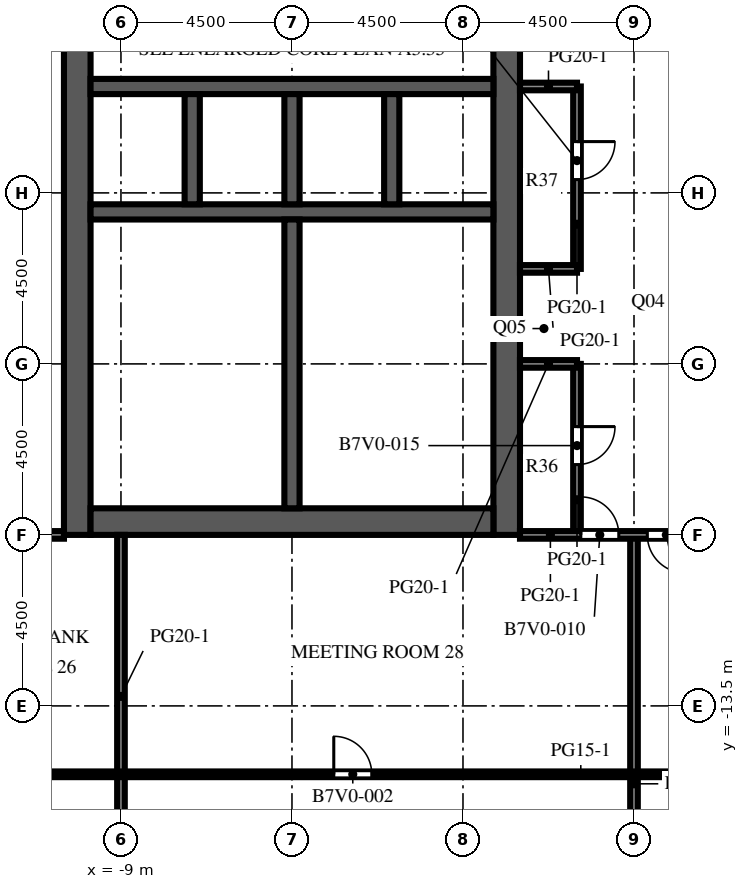
"""IFC4 building model, lengths in metres.
Left out: names, types, materials, properties, quantities, classifications, styles, units other than length and angle.
Written with IfcOpenShell. Run it as: python <this file> out.ifc"""

import sys

from ifc_helpers import new_model, si_unit, direction, frame, frame_2d, origin, place, context, subcontext, project, spatial, rectangle, extrude, element, fill, save


model = new_model("IFC4")
c1 = context("Model", 3, precision=1e-05, world=origin(), true_north=direction((0.0, 1.0)))
c2 = subcontext(c1, "Body", "Model", "MODEL_VIEW")
j1 = project(units=[si_unit("LENGTHUNIT", "METRE"), si_unit("PLANEANGLEUNIT", "RADIAN")], contexts=[c1])
p1 = place(None, origin())
s1 = spatial("IfcSite", under=j1, at=p1, CompositionType="ELEMENT")
p2 = place(p1, origin())
s2 = spatial("IfcBuilding", under=s1, at=p2, CompositionType="ELEMENT")
p3 = place(p2, frame((0.0, 0.0, 239.8)))
s3 = spatial("IfcBuildingStorey", under=s2, at=p3, CompositionType="ELEMENT", Elevation=239.8)
p4 = place(p3, frame((-10.15, -9.0, 0.0), z_axis=(0.0, 0.0, 1.0), x_axis=(0.0, 1.0, 0.0)))
e1 = element("IfcWall", 1, at=p4, inside=s3, PredefinedType="SHEAR", context=c2, shape_type="SweptSolid", body=[
    extrude(rectangle(XDim=27.5, YDim=0.7, at=frame_2d((13.75, 0.0))), origin(), (0.0, 0.0, 1.0), 4.1),
])
p5 = place(p4, frame((12.55, 0.0, 0.0)))
e2 = element("IfcOpeningElement", 2, at=p5, cuts=e1, PredefinedType="OPENING", context=c2, shape_type="SweptSolid", body=[
    extrude(rectangle(XDim=2.4, YDim=2.4, at=frame_2d((1.2, 1.2))), frame((0.0, 0.36, 0.0), z_axis=(0.0, -1.0, 0.0), x_axis=(1.0, 0.0, 0.0)), (0.0, 0.0, 1.0), 0.72),
])
p6 = place(p4, frame((6.825, 0.0, 0.0)))
e3 = element("IfcOpeningElement", 3, at=p6, cuts=e1, PredefinedType="OPENING", context=c2, shape_type="SweptSolid", body=[
    extrude(rectangle(XDim=1.2, YDim=2.1, at=frame_2d((0.6, 1.05))), frame((0.0, 0.36, 0.0), z_axis=(0.0, -1.0, 0.0), x_axis=(1.0, 0.0, 0.0)), (0.0, 0.0, 1.0), 0.72),
])
p7 = place(p4, frame((19.475, 0.0, 0.0)))
e4 = element("IfcOpeningElement", 4, at=p7, cuts=e1, PredefinedType="OPENING", context=c2, shape_type="SweptSolid", body=[
    extrude(rectangle(XDim=1.2, YDim=2.1, at=frame_2d((0.6, 1.05))), frame((0.0, 0.36, 0.0), z_axis=(0.0, -1.0, 0.0), x_axis=(1.0, 0.0, 0.0)), (0.0, 0.0, 1.0), 0.72),
])
p8 = place(p3, frame((1.15, -9.0, 0.0), z_axis=(0.0, 0.0, 1.0), x_axis=(0.0, 1.0, 0.0)))
e5 = element("IfcWall", 5, at=p8, inside=s3, PredefinedType="SHEAR", context=c2, shape_type="SweptSolid", body=[
    extrude(rectangle(XDim=27.5, YDim=0.7, at=frame_2d((13.75, 0.0))), origin(), (0.0, 0.0, 1.0), 4.1),
])
p9 = place(p8, frame((12.55, 0.0, 0.0)))
e6 = element("IfcOpeningElement", 6, at=p9, cuts=e5, PredefinedType="OPENING", context=c2, shape_type="SweptSolid", body=[
    extrude(rectangle(XDim=2.4, YDim=2.4, at=frame_2d((1.2, 1.2))), frame((0.0, 0.36, 0.0), z_axis=(0.0, -1.0, 0.0), x_axis=(1.0, 0.0, 0.0)), (0.0, 0.0, 1.0), 0.72),
])
p10 = place(p8, frame((5.42, 0.0, 0.0)))
e7 = element("IfcOpeningElement", 7, at=p10, cuts=e5, PredefinedType="OPENING", context=c2, shape_type="SweptSolid", body=[
    extrude(rectangle(XDim=1.2, YDim=2.1, at=frame_2d((0.6, 1.05))), frame((0.0, 0.36, 0.0), z_axis=(0.0, -1.0, 0.0), x_axis=(1.0, 0.0, 0.0)), (0.0, 0.0, 1.0), 0.72),
])
p11 = place(p8, frame((19.46, 0.0, 0.0)))
e8 = element("IfcOpeningElement", 8, at=p11, cuts=e5, PredefinedType="OPENING", context=c2, shape_type="SweptSolid", body=[
    extrude(rectangle(XDim=1.0, YDim=2.1, at=frame_2d((0.5, 1.05))), frame((0.0, 0.36, 0.0), z_axis=(0.0, -1.0, 0.0), x_axis=(1.0, 0.0, 0.0)), (0.0, 0.0, 1.0), 0.72),
])
p12 = place(p8, frame((21.17, 0.0, 0.0)))
e9 = element("IfcOpeningElement", 9, at=p12, cuts=e5, PredefinedType="OPENING", context=c2, shape_type="SweptSolid", body=[
    extrude(rectangle(XDim=1.0, YDim=2.1, at=frame_2d((0.5, 1.05))), frame((0.0, 0.36, 0.0), z_axis=(0.0, -1.0, 0.0), x_axis=(1.0, 0.0, 0.0)), (0.0, 0.0, 1.0), 0.72),
])
p13 = place(p8, frame((23.26, 0.0, 0.0)))
e10 = element("IfcOpeningElement", 10, at=p13, cuts=e5, PredefinedType="OPENING", context=c2, shape_type="SweptSolid", body=[
    extrude(rectangle(XDim=1.0, YDim=2.1, at=frame_2d((0.5, 1.05))), frame((0.0, 0.36, 0.0), z_axis=(0.0, -1.0, 0.0), x_axis=(1.0, 0.0, 0.0)), (0.0, 0.0, 1.0), 0.72),
])
p14 = place(p8, frame((25.35, 0.0, 0.0)))
e11 = element("IfcOpeningElement", 11, at=p14, cuts=e5, PredefinedType="OPENING", context=c2, shape_type="SweptSolid", body=[
    extrude(rectangle(XDim=1.0, YDim=2.1, at=frame_2d((0.5, 1.05))), frame((0.0, 0.36, 0.0), z_axis=(0.0, -1.0, 0.0), x_axis=(1.0, 0.0, 0.0)), (0.0, 0.0, 1.0), 0.72),
])
p15 = place(p3, frame((-9.8, -8.65, 0.0), z_axis=(0.0, 0.0, 1.0), x_axis=(1.0, 0.0, 0.0)))
e12 = element("IfcWall", 12, at=p15, inside=s3, PredefinedType="SHEAR", context=c2, shape_type="SweptSolid", body=[
    extrude(rectangle(XDim=10.6, YDim=0.7, at=frame_2d((5.3, 0.0))), origin(), (0.0, 0.0, 1.0), 4.1),
])
p16 = place(p3, frame((-9.8, -0.5, 0.0), z_axis=(0.0, 0.0, 1.0), x_axis=(1.0, 0.0, 0.0)))
e13 = element("IfcWall", 13, at=p16, inside=s3, PredefinedType="SHEAR", context=c2, shape_type="SweptSolid", body=[
    extrude(rectangle(XDim=10.6, YDim=0.4, at=frame_2d((5.3, 0.0))), origin(), (0.0, 0.0, 1.0), 4.1),
])
p17 = place(p3, frame((-9.8, 2.8, 0.0), z_axis=(0.0, 0.0, 1.0), x_axis=(1.0, 0.0, 0.0)))
e14 = element("IfcWall", 14, at=p17, inside=s3, PredefinedType="SHEAR", context=c2, shape_type="SweptSolid", body=[
    extrude(rectangle(XDim=10.6, YDim=0.4, at=frame_2d((5.3, 0.0))), origin(), (0.0, 0.0, 1.0), 4.1),
])
p18 = place(p17, frame((0.688, 0.0, 0.0)))
e15 = element("IfcOpeningElement", 15, at=p18, cuts=e14, PredefinedType="OPENING", context=c2, shape_type="SweptSolid", body=[
    extrude(rectangle(XDim=1.1, YDim=2.1, at=frame_2d((0.55, 1.05))), frame((0.0, 0.21, 0.0), z_axis=(0.0, -1.0, 0.0), x_axis=(1.0, 0.0, 0.0)), (0.0, 0.0, 1.0), 0.42),
])
p19 = place(p17, frame((3.438, 0.0, 0.0)))
e16 = element("IfcOpeningElement", 16, at=p19, cuts=e14, PredefinedType="OPENING", context=c2, shape_type="SweptSolid", body=[
    extrude(rectangle(XDim=1.1, YDim=2.1, at=frame_2d((0.55, 1.05))), frame((0.0, 0.21, 0.0), z_axis=(0.0, -1.0, 0.0), x_axis=(1.0, 0.0, 0.0)), (0.0, 0.0, 1.0), 0.42),
])
p20 = place(p17, frame((6.113, 0.0, 0.0)))
e17 = element("IfcOpeningElement", 17, at=p20, cuts=e14, PredefinedType="OPENING", context=c2, shape_type="SweptSolid", body=[
    extrude(rectangle(XDim=1.0, YDim=2.1, at=frame_2d((0.5, 1.05))), frame((0.0, 0.21, 0.0), z_axis=(0.0, -1.0, 0.0), x_axis=(1.0, 0.0, 0.0)), (0.0, 0.0, 1.0), 0.42),
])
p21 = place(p17, frame((8.863, 0.0, 0.0)))
e18 = element("IfcOpeningElement", 18, at=p21, cuts=e14, PredefinedType="OPENING", context=c2, shape_type="SweptSolid", body=[
    extrude(rectangle(XDim=1.0, YDim=2.1, at=frame_2d((0.5, 1.05))), frame((0.0, 0.21, 0.0), z_axis=(0.0, -1.0, 0.0), x_axis=(1.0, 0.0, 0.0)), (0.0, 0.0, 1.0), 0.42),
])
for number, where, z_axis, x_axis in (
    (19, (-7.125, -0.3, 0.0), (0.0, 0.0, 1.0), (0.0, 1.0, 0.0)),
    (20, (-4.5, -0.3, 0.0), (0.0, 0.0, 1.0), (0.0, 1.0, 0.0)),
    (21, (-1.875, -0.3, 0.0), (0.0, 0.0, 1.0), (0.0, 1.0, 0.0)),
):
    element("IfcWall", number, at=place(p3, frame(where, z_axis=z_axis, x_axis=x_axis)), inside=s3, PredefinedType="SHEAR", context=c2, shape_type="SweptSolid", body=[
        extrude(rectangle(XDim=2.9, YDim=0.4, at=frame_2d((1.45, 0.0))), origin(), (0.0, 0.0, 1.0), 4.1),
    ])
p22 = place(p3, frame((-4.5, -8.3, 0.0), z_axis=(0.0, 0.0, 1.0), x_axis=(0.0, 1.0, 0.0)))
e22 = element("IfcWall", 22, at=p22, inside=s3, PredefinedType="SHEAR", context=c2, shape_type="SweptSolid", body=[
    extrude(rectangle(XDim=7.6, YDim=0.4, at=frame_2d((3.8, 0.0))), origin(), (0.0, 0.0, 1.0), 4.1),
])
p23 = place(p3, frame((-0.7, -5.26, 0.0), z_axis=(0.0, 0.0, 1.0), x_axis=(1.0, 0.0, 0.0)))
e23 = element("IfcWall", 23, at=p23, inside=s3, PredefinedType="PARTITIONING", context=c2, shape_type="SweptSolid", body=[
    extrude(rectangle(XDim=1.5, YDim=0.1, at=frame_2d((0.75, 0.0))), origin(), (0.0, 0.0, 1.0), 3.65),
])
p24 = place(p23, frame((0.25, 0.0, 0.0)))
e24 = element("IfcOpeningElement", 24, at=p24, cuts=e23, PredefinedType="OPENING", context=c2, shape_type="SweptSolid", body=[
    extrude(rectangle(XDim=1.0, YDim=2.1, at=frame_2d((0.5, 1.05))), frame((0.0, 0.06, 0.0), z_axis=(0.0, -1.0, 0.0), x_axis=(1.0, 0.0, 0.0)), (0.0, 0.0, 1.0), 0.12),
])
p25 = place(p3, frame((-0.7, -5.26, 0.0), z_axis=(0.0, 0.0, 1.0), x_axis=(0.0, 1.0, 0.0)))
e25 = element("IfcWall", 25, at=p25, inside=s3, PredefinedType="PARTITIONING", context=c2, shape_type="SweptSolid", body=[
    extrude(rectangle(XDim=2.28, YDim=0.1, at=frame_2d((1.14, 0.0))), origin(), (0.0, 0.0, 1.0), 3.65),
])
p26 = place(p25, frame((0.64, 0.0, 0.0)))
e26 = element("IfcOpeningElement", 26, at=p26, cuts=e25, PredefinedType="OPENING", context=c2, shape_type="SweptSolid", body=[
    extrude(rectangle(XDim=1.0, YDim=2.1, at=frame_2d((0.5, 1.05))), frame((0.0, 0.06, 0.0), z_axis=(0.0, -1.0, 0.0), x_axis=(1.0, 0.0, 0.0)), (0.0, 0.0, 1.0), 0.12),
])
p27 = place(p3, frame((-0.7, -2.98, 0.0), z_axis=(0.0, 0.0, 1.0), x_axis=(0.0, 1.0, 0.0)))
e27 = element("IfcWall", 27, at=p27, inside=s3, PredefinedType="PARTITIONING", context=c2, shape_type="SweptSolid", body=[
    extrude(rectangle(XDim=2.28, YDim=0.1, at=frame_2d((1.14, 0.0))), origin(), (0.0, 0.0, 1.0), 3.65),
])
p28 = place(p27, frame((0.64, 0.0, 0.0)))
e28 = element("IfcOpeningElement", 28, at=p28, cuts=e27, PredefinedType="OPENING", context=c2, shape_type="SweptSolid", body=[
    extrude(rectangle(XDim=1.0, YDim=2.1, at=frame_2d((0.5, 1.05))), frame((0.0, 0.06, 0.0), z_axis=(0.0, -1.0, 0.0), x_axis=(1.0, 0.0, 0.0)), (0.0, 0.0, 1.0), 0.12),
])
for number, where, z_axis, x_axis in (
    (29, (-4.3, -5.26, 0.0), (0.0, 0.0, 1.0), (1.0, 0.0, 0.0)),
    (30, (-4.3, -2.98, 0.0), (0.0, 0.0, 1.0), (1.0, 0.0, 0.0)),
):
    element("IfcWall", number, at=place(p3, frame(where, z_axis=z_axis, x_axis=x_axis)), inside=s3, PredefinedType="PARTITIONING", context=c2, shape_type="SweptSolid", body=[
        extrude(rectangle(XDim=3.6, YDim=0.1, at=frame_2d((1.8, 0.0))), origin(), (0.0, 0.0, 1.0), 3.65),
    ])
p29 = place(p3, frame((-9.0, -17.5, 0.0), z_axis=(0.0, 0.0, 1.0), x_axis=(0.0, 1.0, 0.0)))
e31 = element("IfcWall", 31, at=p29, inside=s3, PredefinedType="PARTITIONING", context=c2, shape_type="SweptSolid", body=[
    extrude(rectangle(XDim=8.5, YDim=0.2, at=frame_2d((4.25, 0.0))), origin(), (0.0, 0.0, 1.0), 3.65),
])
p30 = place(p3, frame((3.0, -9.0, 0.0), z_axis=(0.0, 0.0, 1.0), x_axis=(0.0, 1.0, 0.0)))
e32 = element("IfcWall", 32, at=p30, inside=s3, PredefinedType="PARTITIONING", context=c2, shape_type="SweptSolid", body=[
    extrude(rectangle(XDim=4.5, YDim=0.2, at=frame_2d((2.25, 0.0))), origin(), (0.0, 0.0, 1.0), 3.65),
])
p31 = place(p30, frame((1.85, 0.0, 0.0)))
e33 = element("IfcOpeningElement", 33, at=p31, cuts=e32, PredefinedType="OPENING", context=c2, shape_type="SweptSolid", body=[
    extrude(rectangle(XDim=1.0, YDim=2.1, at=frame_2d((0.5, 1.05))), frame((0.0, 0.11, 0.0), z_axis=(0.0, -1.0, 0.0), x_axis=(1.0, 0.0, 0.0)), (0.0, 0.0, 1.0), 0.22),
])
p32 = place(p3, frame((3.0, -2.0, 0.0), z_axis=(0.0, 0.0, 1.0), x_axis=(0.0, 1.0, 0.0)))
e34 = element("IfcWall", 34, at=p32, inside=s3, PredefinedType="PARTITIONING", context=c2, shape_type="SweptSolid", body=[
    extrude(rectangle(XDim=4.8, YDim=0.2, at=frame_2d((2.4, 0.0))), origin(), (0.0, 0.0, 1.0), 3.65),
])
p33 = place(p32, frame((2.35, 0.0, 0.0)))
e35 = element("IfcOpeningElement", 35, at=p33, cuts=e34, PredefinedType="OPENING", context=c2, shape_type="SweptSolid", body=[
    extrude(rectangle(XDim=1.0, YDim=2.1, at=frame_2d((0.5, 1.05))), frame((0.0, 0.11, 0.0), z_axis=(0.0, -1.0, 0.0), x_axis=(1.0, 0.0, 0.0)), (0.0, 0.0, 1.0), 0.22),
])
p34 = place(p3, frame((4.5, -22.1, 0.0), z_axis=(0.0, 0.0, 1.0), x_axis=(0.0, 1.0, 0.0)))
e36 = element("IfcWall", 36, at=p34, inside=s3, PredefinedType="PARTITIONING", context=c2, shape_type="SweptSolid", body=[
    extrude(rectangle(XDim=13.1, YDim=0.2, at=frame_2d((6.55, 0.0))), origin(), (0.0, 0.0, 1.0), 3.65),
])
p35 = place(p3, frame((21.0, -15.3, 0.0), z_axis=(0.0, 0.0, 1.0), x_axis=(-1.0, 0.0, 0.0)))
e37 = element("IfcWall", 37, at=p35, inside=s3, PredefinedType="PARTITIONING", context=c2, shape_type="SweptSolid", body=[
    extrude(rectangle(XDim=34.5, YDim=0.15, at=frame_2d((17.25, 0.0))), origin(), (0.0, 0.0, 1.0), 3.65),
])
p36 = place(p35, frame((32.4, 0.0, 0.0)))
e38 = element("IfcOpeningElement", 38, at=p36, cuts=e37, PredefinedType="OPENING", context=c2, shape_type="SweptSolid", body=[
    extrude(rectangle(XDim=1.0, YDim=2.1, at=frame_2d((0.5, 1.05))), frame((0.0, 0.085, 0.0), z_axis=(0.0, -1.0, 0.0), x_axis=(1.0, 0.0, 0.0)), (0.0, 0.0, 1.0), 0.17),
])
p37 = place(p35, frame((23.4, 0.0, 0.0)))
e39 = element("IfcOpeningElement", 39, at=p37, cuts=e37, PredefinedType="OPENING", context=c2, shape_type="SweptSolid", body=[
    extrude(rectangle(XDim=1.0, YDim=2.1, at=frame_2d((0.5, 1.05))), frame((0.0, 0.085, 0.0), z_axis=(0.0, -1.0, 0.0), x_axis=(1.0, 0.0, 0.0)), (0.0, 0.0, 1.0), 0.17),
])
p38 = place(p35, frame((11.4, 0.0, 0.0)))
e40 = element("IfcOpeningElement", 40, at=p38, cuts=e37, PredefinedType="OPENING", context=c2, shape_type="SweptSolid", body=[
    extrude(rectangle(XDim=1.0, YDim=2.1, at=frame_2d((0.5, 1.05))), frame((0.0, 0.085, 0.0), z_axis=(0.0, -1.0, 0.0), x_axis=(1.0, 0.0, 0.0)), (0.0, 0.0, 1.0), 0.17),
])
p39 = place(p35, frame((2.4, 0.0, 0.0)))
e41 = element("IfcOpeningElement", 41, at=p39, cuts=e37, PredefinedType="OPENING", context=c2, shape_type="SweptSolid", body=[
    extrude(rectangle(XDim=1.0, YDim=2.1, at=frame_2d((0.5, 1.05))), frame((0.0, 0.085, 0.0), z_axis=(0.0, -1.0, 0.0), x_axis=(1.0, 0.0, 0.0)), (0.0, 0.0, 1.0), 0.17),
])
p40 = place(p3, frame((-10.5, -9.0, 0.0), z_axis=(0.0, 0.0, 1.0), x_axis=(-1.0, 0.0, 0.0)))
e42 = element("IfcWall", 42, at=p40, inside=s3, PredefinedType="PARTITIONING", context=c2, shape_type="SweptSolid", body=[
    extrude(rectangle(XDim=3.0, YDim=0.2, at=frame_2d((1.5, 0.0))), origin(), (0.0, 0.0, 1.0), 3.65),
])
p41 = place(p40, frame((0.9, 0.0, 0.0)))
e43 = element("IfcOpeningElement", 43, at=p41, cuts=e42, PredefinedType="OPENING", context=c2, shape_type="SweptSolid", body=[
    extrude(rectangle(XDim=1.0, YDim=2.1, at=frame_2d((0.5, 1.05))), frame((0.0, 0.11, 0.0), z_axis=(0.0, -1.0, 0.0), x_axis=(1.0, 0.0, 0.0)), (0.0, 0.0, 1.0), 0.22),
])
p42 = place(p3, frame((6.0, -9.0, 0.0), z_axis=(0.0, 0.0, 1.0), x_axis=(-1.0, 0.0, 0.0)))
e44 = element("IfcWall", 44, at=p42, inside=s3, PredefinedType="PARTITIONING", context=c2, shape_type="SweptSolid", body=[
    extrude(rectangle(XDim=4.5, YDim=0.2, at=frame_2d((2.25, 0.0))), origin(), (0.0, 0.0, 1.0), 3.65),
])
p43 = place(p42, frame((1.9, 0.0, 0.0)))
e45 = element("IfcOpeningElement", 45, at=p43, cuts=e44, PredefinedType="OPENING", context=c2, shape_type="SweptSolid", body=[
    extrude(rectangle(XDim=1.0, YDim=2.1, at=frame_2d((0.5, 1.05))), frame((0.0, 0.11, 0.0), z_axis=(0.0, -1.0, 0.0), x_axis=(1.0, 0.0, 0.0)), (0.0, 0.0, 1.0), 0.22),
])
p44 = place(p42, frame((0.15, 0.0, 0.0)))
e46 = element("IfcOpeningElement", 46, at=p44, cuts=e44, PredefinedType="OPENING", context=c2, shape_type="SweptSolid", body=[
    extrude(rectangle(XDim=1.0, YDim=2.1, at=frame_2d((0.5, 1.05))), frame((0.0, 0.11, 0.0), z_axis=(0.0, -1.0, 0.0), x_axis=(1.0, 0.0, 0.0)), (0.0, 0.0, 1.0), 0.22),
])
for number, where, z_axis, x_axis in (
    (47, (1.5, -4.5, 0.0), (0.0, 0.0, 1.0), (1.0, 0.0, 0.0)),
    (48, (1.5, -2.0, 0.0), (0.0, 0.0, 1.0), (1.0, 0.0, 0.0)),
    (49, (1.5, 2.8, 0.0), (0.0, 0.0, 1.0), (1.0, 0.0, 0.0)),
):
    element("IfcWall", number, at=place(p3, frame(where, z_axis=z_axis, x_axis=x_axis)), inside=s3, PredefinedType="PARTITIONING", context=c2, shape_type="SweptSolid", body=[
        extrude(rectangle(XDim=1.5, YDim=0.2, at=frame_2d((0.75, 0.0))), origin(), (0.0, 0.0, 1.0), 3.65),
    ])
p45 = place(p18, origin())
e50 = element("IfcDoor", 50, at=p45, inside=s3, OperationType="DOUBLE_DOOR_SLIDING", PredefinedType="DOOR", context=c2, shape_type="SweptSolid", body=[
    extrude(rectangle(XDim=1.1, YDim=2.1, at=frame_2d((0.55, 1.05))), frame((0.0, 0.025, 0.0), z_axis=(0.0, -1.0, 0.0), x_axis=(1.0, 0.0, 0.0)), (0.0, 0.0, 1.0), 0.05),
])
fill(e15, e50)
p46 = place(p19, origin())
e51 = element("IfcDoor", 51, at=p46, inside=s3, OperationType="DOUBLE_DOOR_SLIDING", PredefinedType="DOOR", context=c2, shape_type="SweptSolid", body=[
    extrude(rectangle(XDim=1.1, YDim=2.1, at=frame_2d((0.55, 1.05))), frame((0.0, 0.025, 0.0), z_axis=(0.0, -1.0, 0.0), x_axis=(1.0, 0.0, 0.0)), (0.0, 0.0, 1.0), 0.05),
])
fill(e16, e51)
p47 = place(p5, origin())
e52 = element("IfcDoor", 52, at=p47, inside=s3, OperationType="DOUBLE_DOOR_DOUBLE_SWING", PredefinedType="DOOR", context=c2, shape_type="SweptSolid", body=[
    extrude(rectangle(XDim=2.4, YDim=2.4, at=frame_2d((1.2, 1.2))), frame((0.0, 0.025, 0.0), z_axis=(0.0, -1.0, 0.0), x_axis=(1.0, 0.0, 0.0)), (0.0, 0.0, 1.0), 0.05),
])
fill(e2, e52)
p48 = place(p9, origin())
e53 = element("IfcDoor", 53, at=p48, inside=s3, OperationType="DOUBLE_DOOR_DOUBLE_SWING", PredefinedType="DOOR", context=c2, shape_type="SweptSolid", body=[
    extrude(rectangle(XDim=2.4, YDim=2.4, at=frame_2d((1.2, 1.2))), frame((0.0, 0.025, 0.0), z_axis=(0.0, -1.0, 0.0), x_axis=(1.0, 0.0, 0.0)), (0.0, 0.0, 1.0), 0.05),
])
fill(e6, e53)
p49 = place(p6, origin())
e54 = element("IfcDoor", 54, at=p49, inside=s3, OperationType="SINGLE_SWING_LEFT", PredefinedType="DOOR", context=c2, shape_type="SweptSolid", body=[
    extrude(rectangle(XDim=1.2, YDim=2.1, at=frame_2d((0.6, 1.05))), frame((0.0, 0.025, 0.0), z_axis=(0.0, -1.0, 0.0), x_axis=(1.0, 0.0, 0.0)), (0.0, 0.0, 1.0), 0.05),
])
fill(e3, e54)
p50 = place(p20, origin())
e55 = element("IfcDoor", 55, at=p50, inside=s3, OperationType="SINGLE_SWING_LEFT", PredefinedType="DOOR", context=c2, shape_type="SweptSolid", body=[
    extrude(rectangle(XDim=1.0, YDim=2.1, at=frame_2d((0.5, 1.05))), frame((0.0, 0.025, 0.0), z_axis=(0.0, -1.0, 0.0), x_axis=(1.0, 0.0, 0.0)), (0.0, 0.0, 1.0), 0.05),
])
fill(e17, e55)
p51 = place(p21, origin())
e56 = element("IfcDoor", 56, at=p51, inside=s3, OperationType="SINGLE_SWING_RIGHT", PredefinedType="DOOR", context=c2, shape_type="SweptSolid", body=[
    extrude(rectangle(XDim=1.0, YDim=2.1, at=frame_2d((0.5, 1.05))), frame((0.0, 0.025, 0.0), z_axis=(0.0, -1.0, 0.0), x_axis=(1.0, 0.0, 0.0)), (0.0, 0.0, 1.0), 0.05),
])
fill(e18, e56)
p52 = place(p10, origin())
e57 = element("IfcDoor", 57, at=p52, inside=s3, OperationType="SINGLE_SWING_LEFT", PredefinedType="DOOR", context=c2, shape_type="SweptSolid", body=[
    extrude(rectangle(XDim=1.2, YDim=2.1, at=frame_2d((0.6, 1.05))), frame((0.0, 0.325, 0.0), z_axis=(0.0, -1.0, 0.0), x_axis=(1.0, 0.0, 0.0)), (0.0, 0.0, 1.0), 0.05),
])
fill(e7, e57)
p53 = place(p24, origin())
e58 = element("IfcDoor", 58, at=p53, inside=s3, OperationType="SINGLE_SWING_RIGHT", PredefinedType="DOOR", context=c2, shape_type="SweptSolid", body=[
    extrude(rectangle(XDim=1.0, YDim=2.1, at=frame_2d((0.5, 1.05))), frame((0.0, 0.025, 0.0), z_axis=(0.0, -1.0, 0.0), x_axis=(1.0, 0.0, 0.0)), (0.0, 0.0, 1.0), 0.05),
])
fill(e24, e58)
p54 = place(p26, origin())
e59 = element("IfcDoor", 59, at=p54, inside=s3, OperationType="SINGLE_SWING_LEFT", PredefinedType="DOOR", context=c2, shape_type="SweptSolid", body=[
    extrude(rectangle(XDim=1.0, YDim=2.1, at=frame_2d((0.5, 1.05))), frame((0.0, 0.025, 0.0), z_axis=(0.0, -1.0, 0.0), x_axis=(1.0, 0.0, 0.0)), (0.0, 0.0, 1.0), 0.05),
])
fill(e26, e59)
p55 = place(p28, origin())
e60 = element("IfcDoor", 60, at=p55, inside=s3, OperationType="SINGLE_SWING_RIGHT", PredefinedType="DOOR", context=c2, shape_type="SweptSolid", body=[
    extrude(rectangle(XDim=1.0, YDim=2.1, at=frame_2d((0.5, 1.05))), frame((0.0, 0.025, 0.0), z_axis=(0.0, -1.0, 0.0), x_axis=(1.0, 0.0, 0.0)), (0.0, 0.0, 1.0), 0.05),
])
fill(e28, e60)
p56 = place(p37, origin())
e61 = element("IfcDoor", 61, at=p56, inside=s3, OperationType="SINGLE_SWING_RIGHT", PredefinedType="DOOR", context=c2, shape_type="SweptSolid", body=[
    extrude(rectangle(XDim=1.0, YDim=2.1, at=frame_2d((0.5, 1.05))), frame((0.0, 0.025, 0.0), z_axis=(0.0, -1.0, 0.0), x_axis=(1.0, 0.0, 0.0)), (0.0, 0.0, 1.0), 0.05),
])
fill(e39, e61)
p57 = place(p43, origin())
e62 = element("IfcDoor", 62, at=p57, inside=s3, OperationType="SINGLE_SWING_RIGHT", PredefinedType="DOOR", context=c2, shape_type="SweptSolid", body=[
    extrude(rectangle(XDim=1.0, YDim=2.1, at=frame_2d((0.5, 1.05))), frame((0.0, 0.025, 0.0), z_axis=(0.0, -1.0, 0.0), x_axis=(1.0, 0.0, 0.0)), (0.0, 0.0, 1.0), 0.05),
])
fill(e45, e62)
p58 = place(p44, origin())
e63 = element("IfcDoor", 63, at=p58, inside=s3, OperationType="SINGLE_SWING_LEFT", PredefinedType="DOOR", context=c2, shape_type="SweptSolid", body=[
    extrude(rectangle(XDim=1.0, YDim=2.1, at=frame_2d((0.5, 1.05))), frame((0.0, 0.025, 0.0), z_axis=(0.0, -1.0, 0.0), x_axis=(1.0, 0.0, 0.0)), (0.0, 0.0, 1.0), 0.05),
])
fill(e46, e63)
p59 = place(p31, origin())
e64 = element("IfcDoor", 64, at=p59, inside=s3, OperationType="SINGLE_SWING_RIGHT", PredefinedType="DOOR", context=c2, shape_type="SweptSolid", body=[
    extrude(rectangle(XDim=1.0, YDim=2.1, at=frame_2d((0.5, 1.05))), frame((0.0, 0.025, 0.0), z_axis=(0.0, -1.0, 0.0), x_axis=(1.0, 0.0, 0.0)), (0.0, 0.0, 1.0), 0.05),
])
fill(e33, e64)
p60 = place(p33, origin())
e65 = element("IfcDoor", 65, at=p60, inside=s3, OperationType="SINGLE_SWING_RIGHT", PredefinedType="DOOR", context=c2, shape_type="SweptSolid", body=[
    extrude(rectangle(XDim=1.0, YDim=2.1, at=frame_2d((0.5, 1.05))), frame((0.0, 0.025, 0.0), z_axis=(0.0, -1.0, 0.0), x_axis=(1.0, 0.0, 0.0)), (0.0, 0.0, 1.0), 0.05),
])
fill(e35, e65)
save(model, sys.argv[1])
